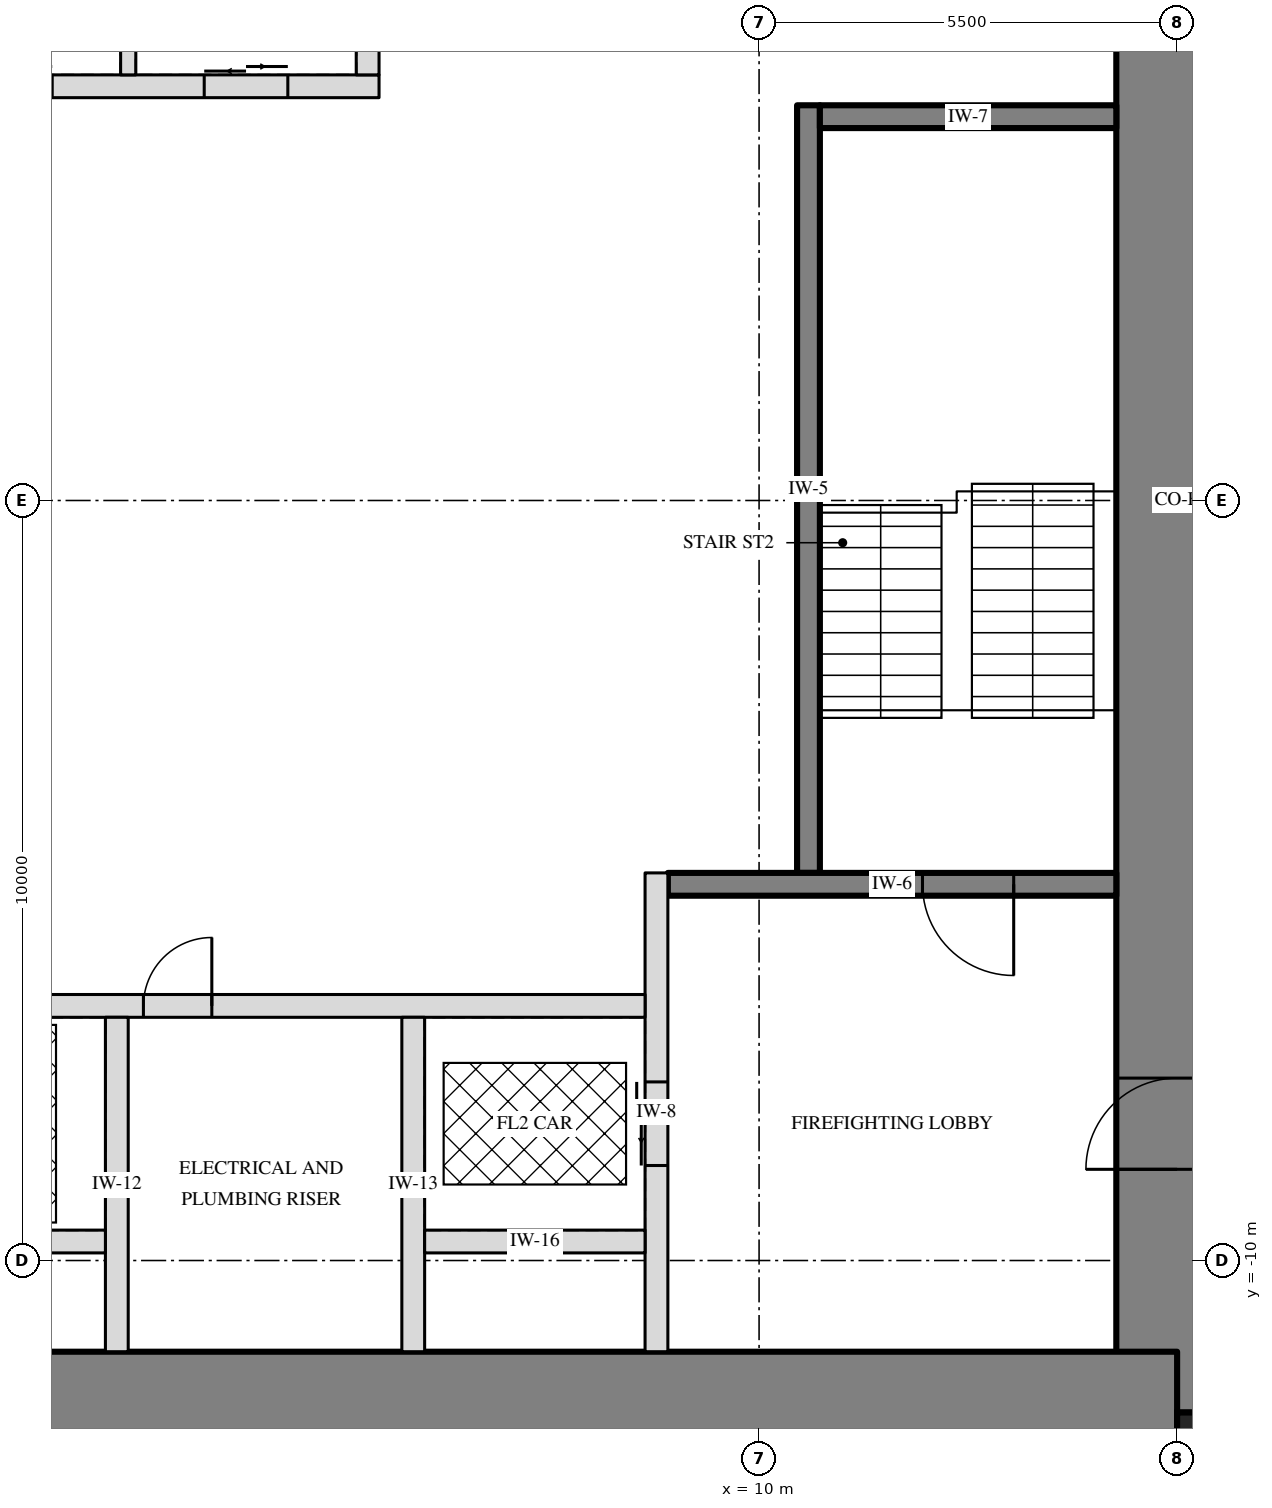
"""IFC4 building model, lengths in metres.
Left out: names, types, materials, properties, quantities, classifications, styles, units other than length and angle.
Written with IfcOpenShell. Run it as: python <this file> out.ifc"""

import sys

from ifc_helpers import new_model, si_unit, direction, frame, frame_2d, origin, origin_2d, place, context, subcontext, project, spatial, rectangle, extrude, element, fill, save


model = new_model("IFC4")
c1 = context("Model", 3, precision=1e-05, world=origin(), true_north=direction((0.0, 1.0)))
c2 = subcontext(c1, "Body", "Model", "MODEL_VIEW")
j1 = project(units=[si_unit("LENGTHUNIT", "METRE"), si_unit("PLANEANGLEUNIT", "RADIAN")], contexts=[c1])
p1 = place(None, origin())
s1 = spatial("IfcSite", under=j1, at=p1, CompositionType="ELEMENT")
p2 = place(p1, origin())
s2 = spatial("IfcBuilding", under=s1, at=p2, CompositionType="ELEMENT")
p3 = place(p2, frame((0.0, 0.0, 199.5)))
s3 = spatial("IfcBuildingStorey", under=s2, at=p3, CompositionType="ELEMENT", Elevation=199.5)
p4 = place(p3, frame((15.5, -12.0, -0.25), z_axis=(0.0, 0.0, 1.0), x_axis=(0.0, 1.0, 0.0)))
e1 = element("IfcWall", 1, at=p4, inside=s3, PredefinedType="SHEAR", context=c2, shape_type="SweptSolid", body=[
    extrude(rectangle(XDim=24.0, YDim=1.6, at=frame_2d((12.0, 0.0))), origin(), (0.0, 0.0, 1.0), 3.75),
])
p5 = place(p4, frame((3.2, 0.0, 0.25)))
e2 = element("IfcOpeningElement", 2, at=p5, cuts=e1, PredefinedType="OPENING", context=c2, shape_type="SweptSolid", body=[
    extrude(rectangle(XDim=1.2, YDim=2.1, at=frame_2d((0.6, 1.05))), frame((0.0, 0.81, 0.0), z_axis=(0.0, -1.0, 0.0), x_axis=(1.0, 0.0, 0.0)), (0.0, 0.0, 1.0), 1.62),
])
p6 = place(p4, frame((19.3, 0.0, 0.25)))
e3 = element("IfcOpeningElement", 3, at=p6, cuts=e1, PredefinedType="OPENING", context=c2, shape_type="SweptSolid", body=[
    extrude(rectangle(XDim=1.8, YDim=2.1, at=frame_2d((0.9, 1.05))), frame((0.0, 0.81, 0.0), z_axis=(0.0, -1.0, 0.0), x_axis=(1.0, 0.0, 0.0)), (0.0, 0.0, 1.0), 1.62),
])
p7 = place(p3, frame((-15.5, -12.0, -0.25), z_axis=(0.0, 0.0, 1.0), x_axis=(1.0, 0.0, 0.0)))
e4 = element("IfcWall", 4, at=p7, inside=s3, PredefinedType="SHEAR", context=c2, shape_type="SweptSolid", body=[
    extrude(rectangle(XDim=31.0, YDim=1.6, at=frame_2d((15.5, 0.0))), origin(), (0.0, 0.0, 1.0), 3.75),
])
p8 = place(p3, frame((15.9, -12.4, -0.25), z_axis=(0.0, 0.0, 1.0), x_axis=(1.0, 0.0, 0.0)))
e5 = element("IfcColumn", 5, at=p8, inside=s3, PredefinedType="COLUMN", context=c2, shape_type="SweptSolid", body=[
    extrude(rectangle(XDim=0.8, YDim=0.8, at=origin_2d()), origin(), (0.0, 0.0, 1.0), 3.75),
])
p9 = place(p3, frame((10.65, -4.9, 0.0), z_axis=(0.0, 0.0, 1.0), x_axis=(0.0, 1.0, 0.0)))
e6 = element("IfcWall", 6, at=p9, inside=s3, PredefinedType="SOLIDWALL", context=c2, shape_type="SweptSolid", body=[
    extrude(rectangle(XDim=10.1, YDim=0.3, at=frame_2d((5.05, 0.0))), origin(), (0.0, 0.0, 1.0), 3.5),
])
p10 = place(p3, frame((14.7, -5.05, 0.0), z_axis=(0.0, 0.0, 1.0), x_axis=(-1.0, 0.0, 0.0)))
e7 = element("IfcWall", 7, at=p10, inside=s3, PredefinedType="SOLIDWALL", context=c2, shape_type="SweptSolid", body=[
    extrude(rectangle(XDim=5.9, YDim=0.3, at=frame_2d((2.95, 0.0))), origin(), (0.0, 0.0, 1.0), 3.5),
])
p11 = place(p10, frame((1.35, 0.0, 0.0)))
e8 = element("IfcOpeningElement", 8, at=p11, cuts=e7, PredefinedType="OPENING", context=c2, shape_type="SweptSolid", body=[
    extrude(rectangle(XDim=1.2, YDim=2.1, at=frame_2d((0.6, 1.05))), frame((0.0, 0.16, 0.0), z_axis=(0.0, -1.0, 0.0), x_axis=(1.0, 0.0, 0.0)), (0.0, 0.0, 1.0), 0.32),
])
p12 = place(p3, frame((14.7, 5.05, 0.0), z_axis=(0.0, 0.0, 1.0), x_axis=(-1.0, 0.0, 0.0)))
e9 = element("IfcWall", 9, at=p12, inside=s3, PredefinedType="SOLIDWALL", context=c2, shape_type="SweptSolid", body=[
    extrude(rectangle(XDim=3.9, YDim=0.3, at=frame_2d((1.95, 0.0))), origin(), (0.0, 0.0, 1.0), 3.5),
])
p13 = place(p3, frame((8.65, -11.2, 0.0), z_axis=(0.0, 0.0, 1.0), x_axis=(0.0, 1.0, 0.0)))
e10 = element("IfcWall", 10, at=p13, inside=s3, PredefinedType="PARTITIONING", context=c2, shape_type="SweptSolid", body=[
    extrude(rectangle(XDim=6.3, YDim=0.3, at=frame_2d((3.15, 0.0))), origin(), (0.0, 0.0, 1.0), 3.5),
])
p14 = place(p13, frame((2.45, 0.0, 0.0)))
e11 = element("IfcOpeningElement", 11, at=p14, cuts=e10, PredefinedType="OPENING", context=c2, shape_type="SweptSolid", body=[
    extrude(rectangle(XDim=1.1, YDim=2.1, at=frame_2d((0.55, 1.05))), frame((0.0, 0.16, 0.0), z_axis=(0.0, -1.0, 0.0), x_axis=(1.0, 0.0, 0.0)), (0.0, 0.0, 1.0), 0.32),
])
p15 = place(p3, frame((-8.5, -6.65, 0.0), z_axis=(0.0, 0.0, 1.0), x_axis=(1.0, 0.0, 0.0)))
e12 = element("IfcWall", 12, at=p15, inside=s3, PredefinedType="PARTITIONING", context=c2, shape_type="SweptSolid", body=[
    extrude(rectangle(XDim=17.0, YDim=0.3, at=frame_2d((8.5, 0.0))), origin(), (0.0, 0.0, 1.0), 3.5),
])
p16 = place(p15, frame((7.8, 0.0, 0.0)))
e13 = element("IfcOpeningElement", 13, at=p16, cuts=e12, PredefinedType="OPENING", context=c2, shape_type="SweptSolid", body=[
    extrude(rectangle(XDim=1.3, YDim=2.4, at=frame_2d((0.65, 1.2))), frame((0.0, 0.16, 0.0), z_axis=(0.0, -1.0, 0.0), x_axis=(1.0, 0.0, 0.0)), (0.0, 0.0, 1.0), 0.32),
])
p17 = place(p15, frame((5.65, 0.0, 0.0)))
e14 = element("IfcOpeningElement", 14, at=p17, cuts=e12, PredefinedType="OPENING", context=c2, shape_type="SweptSolid", body=[
    extrude(rectangle(XDim=0.9, YDim=2.1, at=frame_2d((0.45, 1.05))), frame((0.0, 0.16, 0.0), z_axis=(0.0, -1.0, 0.0), x_axis=(1.0, 0.0, 0.0)), (0.0, 0.0, 1.0), 0.32),
])
p18 = place(p15, frame((10.4, 0.0, 0.0)))
e15 = element("IfcOpeningElement", 15, at=p18, cuts=e12, PredefinedType="OPENING", context=c2, shape_type="SweptSolid", body=[
    extrude(rectangle(XDim=0.9, YDim=2.1, at=frame_2d((0.45, 1.05))), frame((0.0, 0.16, 0.0), z_axis=(0.0, -1.0, 0.0), x_axis=(1.0, 0.0, 0.0)), (0.0, 0.0, 1.0), 0.32),
])
for number, where, z_axis, x_axis in (
    (16, (1.55, -11.2, 0.0), (0.0, 0.0, 1.0), (0.0, 1.0, 0.0)),
    (17, (5.45, -11.2, 0.0), (0.0, 0.0, 1.0), (0.0, 1.0, 0.0)),
):
    element("IfcWall", number, at=place(p3, frame(where, z_axis=z_axis, x_axis=x_axis)), inside=s3, PredefinedType="PARTITIONING", context=c2, shape_type="SweptSolid", body=[
        extrude(rectangle(XDim=4.4, YDim=0.3, at=frame_2d((2.2, 0.0))), origin(), (0.0, 0.0, 1.0), 3.5),
    ])
for number, where, z_axis, x_axis in (
    (18, (-1.5, -9.75, 0.0), (0.0, 0.0, 1.0), (1.0, 0.0, 0.0)),
    (19, (5.6, -9.75, 0.0), (0.0, 0.0, 1.0), (1.0, 0.0, 0.0)),
):
    element("IfcWall", number, at=place(p3, frame(where, z_axis=z_axis, x_axis=x_axis)), inside=s3, PredefinedType="PARTITIONING", context=c2, shape_type="SweptSolid", body=[
        extrude(rectangle(XDim=2.9, YDim=0.3, at=frame_2d((1.45, 0.0))), origin(), (0.0, 0.0, 1.0), 3.5),
    ])
p19 = place(p3, frame((-4.7, 5.45, 0.0), z_axis=(0.0, 0.0, 1.0), x_axis=(1.0, 0.0, 0.0)))
e20 = element("IfcWall", 20, at=p19, inside=s3, PredefinedType="PARTITIONING", context=c2, shape_type="SweptSolid", body=[
    extrude(rectangle(XDim=9.7, YDim=0.3, at=frame_2d((4.85, 0.0))), origin(), (0.0, 0.0, 1.0), 3.5),
])
p20 = place(p19, frame((1.2, 0.0, 0.0)))
e21 = element("IfcOpeningElement", 21, at=p20, cuts=e20, PredefinedType="OPENING", context=c2, shape_type="SweptSolid", body=[
    extrude(rectangle(XDim=1.1, YDim=2.1, at=frame_2d((0.55, 1.05))), frame((0.0, 0.16, 0.0), z_axis=(0.0, -1.0, 0.0), x_axis=(1.0, 0.0, 0.0)), (0.0, 0.0, 1.0), 0.32),
])
p21 = place(p19, frame((4.3, 0.0, 0.0)))
e22 = element("IfcOpeningElement", 22, at=p21, cuts=e20, PredefinedType="OPENING", context=c2, shape_type="SweptSolid", body=[
    extrude(rectangle(XDim=1.1, YDim=2.1, at=frame_2d((0.55, 1.05))), frame((0.0, 0.16, 0.0), z_axis=(0.0, -1.0, 0.0), x_axis=(1.0, 0.0, 0.0)), (0.0, 0.0, 1.0), 0.32),
])
p22 = place(p19, frame((7.4, 0.0, 0.0)))
e23 = element("IfcOpeningElement", 23, at=p22, cuts=e20, PredefinedType="OPENING", context=c2, shape_type="SweptSolid", body=[
    extrude(rectangle(XDim=1.1, YDim=2.1, at=frame_2d((0.55, 1.05))), frame((0.0, 0.16, 0.0), z_axis=(0.0, -1.0, 0.0), x_axis=(1.0, 0.0, 0.0)), (0.0, 0.0, 1.0), 0.32),
])
p23 = place(p3, frame((4.85, 5.6, 0.0), z_axis=(0.0, 0.0, 1.0), x_axis=(0.0, 1.0, 0.0)))
e24 = element("IfcWall", 24, at=p23, inside=s3, PredefinedType="PARTITIONING", context=c2, shape_type="SweptSolid", body=[
    extrude(rectangle(XDim=2.8, YDim=0.3, at=frame_2d((1.4, 0.0))), origin(), (0.0, 0.0, 1.0), 3.5),
])
p24 = place(p3, frame((1.7, 5.6, 0.0), z_axis=(0.0, 0.0, 1.0), x_axis=(0.0, 1.0, 0.0)))
e25 = element("IfcWall", 25, at=p24, inside=s3, PredefinedType="PARTITIONING", context=c2, shape_type="SweptSolid", body=[
    extrude(rectangle(XDim=2.8, YDim=0.2, at=frame_2d((1.4, 0.0))), origin(), (0.0, 0.0, 1.0), 3.5),
])
p25 = place(p3, frame((-10.65, 3.6, 0.0), z_axis=(0.0, 0.0, 1.0), x_axis=(1.0, 0.0, 0.0)))
e26 = element("IfcWall", 26, at=p25, inside=s3, PredefinedType="PARTITIONING", context=c2, shape_type="SweptSolid", body=[
    extrude(rectangle(XDim=21.3, YDim=0.3, at=frame_2d((10.65, 0.0))), origin(), (0.0, 0.0, 1.0), 3.5),
])
p26 = place(p25, frame((10.05, 0.0, 0.0)))
e27 = element("IfcOpeningElement", 27, at=p26, cuts=e26, PredefinedType="OPENING", context=c2, shape_type="SweptSolid", body=[
    extrude(rectangle(XDim=1.2, YDim=2.1, at=frame_2d((0.6, 1.05))), frame((0.0, 0.16, 0.0), z_axis=(0.0, -1.0, 0.0), x_axis=(1.0, 0.0, 0.0)), (0.0, 0.0, 1.0), 0.32),
])
p27 = place(p25, frame((19.238, 0.0, 0.0)))
e28 = element("IfcOpeningElement", 28, at=p27, cuts=e26, PredefinedType="OPENING", context=c2, shape_type="SweptSolid", body=[
    extrude(rectangle(XDim=0.9, YDim=2.1, at=frame_2d((0.45, 1.05))), frame((0.0, 0.16, 0.0), z_axis=(0.0, -1.0, 0.0), x_axis=(1.0, 0.0, 0.0)), (0.0, 0.0, 1.0), 0.32),
])
p28 = place(p3, frame((4.2, -6.65, 0.0), z_axis=(0.0, 0.0, 1.0), x_axis=(0.0, 1.0, 0.0)))
e29 = element("IfcWall", 29, at=p28, inside=s3, PredefinedType="PARTITIONING", context=c2, shape_type="SweptSolid", body=[
    extrude(rectangle(XDim=10.25, YDim=0.3, at=frame_2d((5.125, 0.0))), origin(), (0.0, 0.0, 1.0), 3.5),
])
p29 = place(p28, frame((2.15, 0.0, 0.0)))
e30 = element("IfcOpeningElement", 30, at=p29, cuts=e29, PredefinedType="OPENING", context=c2, shape_type="SweptSolid", body=[
    extrude(rectangle(XDim=0.9, YDim=2.1, at=frame_2d((0.45, 1.05))), frame((0.0, 0.16, 0.0), z_axis=(0.0, -1.0, 0.0), x_axis=(1.0, 0.0, 0.0)), (0.0, 0.0, 1.0), 0.32),
])
p30 = place(p28, frame((7.275, 0.0, 0.0)))
e31 = element("IfcOpeningElement", 31, at=p30, cuts=e29, PredefinedType="OPENING", context=c2, shape_type="SweptSolid", body=[
    extrude(rectangle(XDim=0.9, YDim=2.1, at=frame_2d((0.45, 1.05))), frame((0.0, 0.16, 0.0), z_axis=(0.0, -1.0, 0.0), x_axis=(1.0, 0.0, 0.0)), (0.0, 0.0, 1.0), 0.32),
])
p31 = place(p3, frame((10.65, -1.45, 0.0), z_axis=(0.0, 0.0, 1.0), x_axis=(-1.0, 0.0, 0.0)))
e32 = element("IfcWall", 32, at=p31, inside=s3, PredefinedType="PARTITIONING", context=c2, shape_type="SweptSolid", body=[
    extrude(rectangle(XDim=6.45, YDim=0.3, at=frame_2d((3.225, 0.0))), origin(), (0.0, 0.0, 1.0), 3.5),
])
p32 = place(p3, frame((7.425, -1.45, 0.0), z_axis=(0.0, 0.0, 1.0), x_axis=(0.0, 1.0, 0.0)))
e33 = element("IfcWall", 33, at=p32, inside=s3, PredefinedType="PARTITIONING", context=c2, shape_type="SweptSolid", body=[
    extrude(rectangle(XDim=5.05, YDim=0.3, at=frame_2d((2.525, 0.0))), origin(), (0.0, 0.0, 1.0), 3.5),
])
p33 = place(p3, frame((5.15, 5.3, 0.0), z_axis=(0.0, 0.0, 1.0), x_axis=(0.0, 1.0, 0.0)))
e34 = element("IfcWall", 34, at=p33, inside=s3, PredefinedType="PARTITIONING", context=c2, shape_type="SweptSolid", body=[
    extrude(rectangle(XDim=5.9, YDim=0.3, at=frame_2d((2.95, 0.0))), origin(), (0.0, 0.0, 1.0), 3.5),
])
p34 = place(p33, frame((4.15, 0.0, 0.0)))
e35 = element("IfcOpeningElement", 35, at=p34, cuts=e34, PredefinedType="OPENING", context=c2, shape_type="SweptSolid", body=[
    extrude(rectangle(XDim=0.9, YDim=2.1, at=frame_2d((0.45, 1.05))), frame((0.0, 0.16, 0.0), z_axis=(0.0, -1.0, 0.0), x_axis=(1.0, 0.0, 0.0)), (0.0, 0.0, 1.0), 0.32),
])
p35 = place(p11, origin())
e36 = element("IfcDoor", 36, at=p35, inside=s3, OperationType="SINGLE_SWING_LEFT", PredefinedType="DOOR", context=c2, shape_type="SweptSolid", body=[
    extrude(rectangle(XDim=1.2, YDim=2.1, at=frame_2d((0.6, 1.05))), frame((0.0, 0.025, 0.0), z_axis=(0.0, -1.0, 0.0), x_axis=(1.0, 0.0, 0.0)), (0.0, 0.0, 1.0), 0.05),
])
fill(e8, e36)
p36 = place(p5, origin())
e37 = element("IfcDoor", 37, at=p36, inside=s3, OperationType="SINGLE_SWING_LEFT", PredefinedType="DOOR", context=c2, shape_type="SweptSolid", body=[
    extrude(rectangle(XDim=1.2, YDim=2.1, at=frame_2d((0.6, 1.05))), frame((0.0, 0.025, 0.0), z_axis=(0.0, -1.0, 0.0), x_axis=(1.0, 0.0, 0.0)), (0.0, 0.0, 1.0), 0.05),
])
fill(e2, e37)
p37 = place(p14, origin())
e38 = element("IfcDoor", 38, at=p37, inside=s3, OperationType="DOUBLE_DOOR_SLIDING", PredefinedType="DOOR", context=c2, shape_type="SweptSolid", body=[
    extrude(rectangle(XDim=1.1, YDim=2.1, at=frame_2d((0.55, 1.05))), frame((0.0, 0.025, 0.0), z_axis=(0.0, -1.0, 0.0), x_axis=(1.0, 0.0, 0.0)), (0.0, 0.0, 1.0), 0.05),
])
fill(e11, e38)
p38 = place(p21, origin())
e39 = element("IfcDoor", 39, at=p38, inside=s3, OperationType="DOUBLE_DOOR_SLIDING", PredefinedType="DOOR", context=c2, shape_type="SweptSolid", body=[
    extrude(rectangle(XDim=1.1, YDim=2.1, at=frame_2d((0.55, 1.05))), frame((0.0, 0.025, 0.0), z_axis=(0.0, -1.0, 0.0), x_axis=(1.0, 0.0, 0.0)), (0.0, 0.0, 1.0), 0.05),
])
fill(e22, e39)
p39 = place(p22, origin())
e40 = element("IfcDoor", 40, at=p39, inside=s3, OperationType="DOUBLE_DOOR_SLIDING", PredefinedType="DOOR", context=c2, shape_type="SweptSolid", body=[
    extrude(rectangle(XDim=1.1, YDim=2.1, at=frame_2d((0.55, 1.05))), frame((0.0, 0.025, 0.0), z_axis=(0.0, -1.0, 0.0), x_axis=(1.0, 0.0, 0.0)), (0.0, 0.0, 1.0), 0.05),
])
fill(e23, e40)
p40 = place(p18, origin())
e41 = element("IfcDoor", 41, at=p40, inside=s3, OperationType="SINGLE_SWING_RIGHT", PredefinedType="DOOR", context=c2, shape_type="SweptSolid", body=[
    extrude(rectangle(XDim=0.9, YDim=2.1, at=frame_2d((0.45, 1.05))), frame((0.0, 0.025, 0.0), z_axis=(0.0, -1.0, 0.0), x_axis=(1.0, 0.0, 0.0)), (0.0, 0.0, 1.0), 0.05),
])
fill(e15, e41)
p41 = place(p29, origin())
e42 = element("IfcDoor", 42, at=p41, inside=s3, OperationType="SINGLE_SWING_LEFT", PredefinedType="DOOR", context=c2, shape_type="SweptSolid", body=[
    extrude(rectangle(XDim=0.9, YDim=2.1, at=frame_2d((0.45, 1.05))), frame((0.0, 0.025, 0.0), z_axis=(0.0, -1.0, 0.0), x_axis=(1.0, 0.0, 0.0)), (0.0, 0.0, 1.0), 0.05),
])
fill(e30, e42)
p42 = place(p30, origin())
e43 = element("IfcDoor", 43, at=p42, inside=s3, OperationType="SINGLE_SWING_RIGHT", PredefinedType="DOOR", context=c2, shape_type="SweptSolid", body=[
    extrude(rectangle(XDim=0.9, YDim=2.1, at=frame_2d((0.45, 1.05))), frame((0.0, 0.025, 0.0), z_axis=(0.0, -1.0, 0.0), x_axis=(1.0, 0.0, 0.0)), (0.0, 0.0, 1.0), 0.05),
])
fill(e31, e43)
p43 = place(p27, origin())
e44 = element("IfcDoor", 44, at=p43, inside=s3, OperationType="SINGLE_SWING_RIGHT", PredefinedType="DOOR", context=c2, shape_type="SweptSolid", body=[
    extrude(rectangle(XDim=0.9, YDim=2.1, at=frame_2d((0.45, 1.05))), frame((0.0, 0.025, 0.0), z_axis=(0.0, -1.0, 0.0), x_axis=(1.0, 0.0, 0.0)), (0.0, 0.0, 1.0), 0.05),
])
fill(e28, e44)
save(model, sys.argv[1])
